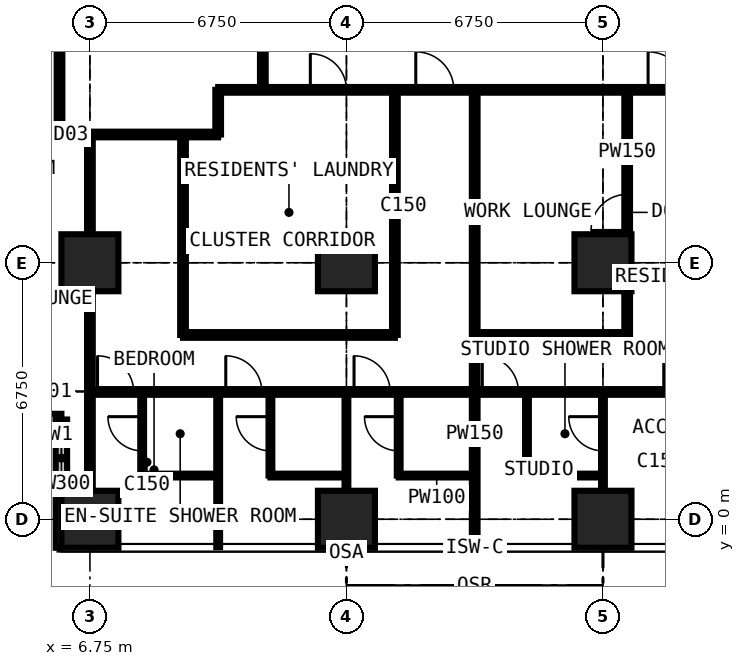
"""IFC4 building model, lengths in metres.
Left out: names, types, materials, properties, quantities, classifications, styles, units other than length and angle.
Written with IfcOpenShell. Run it as: python <this file> out.ifc"""

import sys

from ifc_helpers import new_model, si_unit, direction, frame, frame_2d, origin, origin_2d, place, context, subcontext, project, spatial, rectangle, extrude, element, fill, save


model = new_model("IFC4")
c1 = context("Model", 3, precision=1e-05, world=origin(), true_north=direction((0.0, 1.0)))
c2 = subcontext(c1, "Body", "Model", "MODEL_VIEW")
j1 = project(units=[si_unit("LENGTHUNIT", "METRE"), si_unit("PLANEANGLEUNIT", "RADIAN")], contexts=[c1])
p1 = place(None, origin())
s1 = spatial("IfcSite", under=j1, at=p1, CompositionType="ELEMENT")
p2 = place(p1, origin())
s2 = spatial("IfcBuilding", under=s1, at=p2, CompositionType="ELEMENT")
p3 = place(p2, frame((0.0, 0.0, 153.0)))
s3 = spatial("IfcBuildingStorey", under=s2, at=p3, CompositionType="ELEMENT", Elevation=153.0)
for number, where, z_axis, x_axis in (
    (1, (6.75, 0.0, 0.0), (0.0, 0.0, 1.0), (1.0, 0.0, 0.0)),
    (2, (6.75, 6.75, 0.0), (0.0, 0.0, 1.0), (1.0, 0.0, 0.0)),
    (3, (13.5, 0.0, 0.0), (0.0, 0.0, 1.0), (1.0, 0.0, 0.0)),
    (4, (13.5, 6.75, 0.0), (0.0, 0.0, 1.0), (1.0, 0.0, 0.0)),
    (5, (20.25, 0.0, 0.0), (0.0, 0.0, 1.0), (1.0, 0.0, 0.0)),
    (6, (20.25, 6.75, 0.0), (0.0, 0.0, 1.0), (1.0, 0.0, 0.0)),
):
    element("IfcColumn", number, at=place(p3, frame(where, z_axis=z_axis, x_axis=x_axis)), inside=s3, PredefinedType="COLUMN", context=c2, shape_type="SweptSolid", body=[
        extrude(rectangle(XDim=1.5, YDim=1.5, at=origin_2d()), origin(), (0.0, 0.0, 1.0), 3.6),
    ])
p4 = place(p3, frame((2.625, 2.625, 0.0), z_axis=(0.0, 0.0, 1.0), x_axis=(1.0, 0.0, 0.0)))
e7 = element("IfcWall", 7, at=p4, inside=s3, PredefinedType="SOLIDWALL", context=c2, shape_type="SweptSolid", body=[
    extrude(rectangle(XDim=3.375, YDim=0.3, at=frame_2d((1.688, 0.0))), origin(), (0.0, 0.0, 1.0), 3.375),
])
p5 = place(p4, frame((0.788, 0.0, 0.6)))
e8 = element("IfcOpeningElement", 8, at=p5, cuts=e7, PredefinedType="OPENING", context=c2, shape_type="SweptSolid", body=[
    extrude(rectangle(XDim=1.8, YDim=2.1, at=frame_2d((0.9, 1.05))), frame((0.0, 0.16, 0.0), z_axis=(0.0, -1.0, 0.0), x_axis=(1.0, 0.0, 0.0)), (0.0, 0.0, 1.0), 0.32),
])
p6 = place(p3, frame((6.0, 2.625, 0.0), z_axis=(0.0, 0.0, 1.0), x_axis=(0.0, -1.0, 0.0)))
e9 = element("IfcWall", 9, at=p6, inside=s3, PredefinedType="SOLIDWALL", context=c2, shape_type="SweptSolid", body=[
    extrude(rectangle(XDim=3.375, YDim=0.3, at=frame_2d((1.688, 0.0))), origin(), (0.0, 0.0, 1.0), 3.375),
])
p7 = place(p6, frame((0.268, 0.0, 0.9)))
e10 = element("IfcOpeningElement", 10, at=p7, cuts=e9, PredefinedType="OPENING", context=c2, shape_type="SweptSolid", body=[
    extrude(rectangle(XDim=1.5, YDim=1.8, at=frame_2d((0.75, 0.9))), frame((0.0, 0.16, 0.0), z_axis=(0.0, -1.0, 0.0), x_axis=(1.0, 0.0, 0.0)), (0.0, 0.0, 1.0), 0.32),
])
p8 = place(p3, frame((-0.734, 10.125, 0.0), z_axis=(0.0, 0.0, 1.0), x_axis=(1.0, 0.0, 0.0)))
e11 = element("IfcWall", 11, at=p8, inside=s3, PredefinedType="PARTITIONING", context=c2, shape_type="SweptSolid", body=[
    extrude(rectangle(XDim=10.859, YDim=0.15, at=frame_2d((5.429, 0.0))), origin(), (0.0, 0.0, 1.0), 3.375),
])
p9 = place(p8, frame((4.884, 0.0, 0.0)))
e12 = element("IfcOpeningElement", 12, at=p9, cuts=e11, PredefinedType="OPENING", context=c2, shape_type="SweptSolid", body=[
    extrude(rectangle(XDim=1.0, YDim=2.2, at=frame_2d((0.5, 1.1))), frame((0.0, 0.085, 0.0), z_axis=(0.0, -1.0, 0.0), x_axis=(1.0, 0.0, 0.0)), (0.0, 0.0, 1.0), 0.17),
])
p10 = place(p3, frame((5.95, 10.125, 0.0), z_axis=(0.0, 0.0, 1.0), x_axis=(0.0, 1.0, 0.0)))
e13 = element("IfcWall", 13, at=p10, inside=s3, PredefinedType="PARTITIONING", context=c2, shape_type="SweptSolid", body=[
    extrude(rectangle(XDim=2.65, YDim=0.15, at=frame_2d((1.325, 0.0))), origin(), (0.0, 0.0, 1.0), 3.375),
])
p11 = place(p3, frame((6.75, -0.734, 0.0), z_axis=(0.0, 0.0, 1.0), x_axis=(0.0, 1.0, 0.0)))
e14 = element("IfcWall", 14, at=p11, inside=s3, PredefinedType="PARTITIONING", context=c2, shape_type="SweptSolid", body=[
    extrude(rectangle(XDim=10.859, YDim=0.15, at=frame_2d((5.429, 0.0))), origin(), (0.0, 0.0, 1.0), 2.877),
])
p12 = place(p3, frame((6.75, 3.35, 0.0), z_axis=(0.0, 0.0, 1.0), x_axis=(1.0, 0.0, 0.0)))
e15 = element("IfcWall", 15, at=p12, inside=s3, PredefinedType="PARTITIONING", context=c2, shape_type="SweptSolid", body=[
    extrude(rectangle(XDim=20.25, YDim=0.15, at=frame_2d((10.125, 0.0))), origin(), (0.0, 0.0, 1.0), 3.375),
])
p13 = place(p12, frame((0.2, 0.0, 0.0)))
e16 = element("IfcOpeningElement", 16, at=p13, cuts=e15, PredefinedType="OPENING", context=c2, shape_type="SweptSolid", body=[
    extrude(rectangle(XDim=0.95, YDim=2.2, at=frame_2d((0.475, 1.1))), frame((0.0, 0.085, 0.0), z_axis=(0.0, -1.0, 0.0), x_axis=(1.0, 0.0, 0.0)), (0.0, 0.0, 1.0), 0.17),
])
p14 = place(p12, frame((3.575, 0.0, 0.0)))
e17 = element("IfcOpeningElement", 17, at=p14, cuts=e15, PredefinedType="OPENING", context=c2, shape_type="SweptSolid", body=[
    extrude(rectangle(XDim=0.95, YDim=2.2, at=frame_2d((0.475, 1.1))), frame((0.0, 0.085, 0.0), z_axis=(0.0, -1.0, 0.0), x_axis=(1.0, 0.0, 0.0)), (0.0, 0.0, 1.0), 0.17),
])
p15 = place(p12, frame((6.95, 0.0, 0.0)))
e18 = element("IfcOpeningElement", 18, at=p15, cuts=e15, PredefinedType="OPENING", context=c2, shape_type="SweptSolid", body=[
    extrude(rectangle(XDim=0.95, YDim=2.2, at=frame_2d((0.475, 1.1))), frame((0.0, 0.085, 0.0), z_axis=(0.0, -1.0, 0.0), x_axis=(1.0, 0.0, 0.0)), (0.0, 0.0, 1.0), 0.17),
])
p16 = place(p12, frame((15.1, 0.0, 0.0)))
e19 = element("IfcOpeningElement", 19, at=p16, cuts=e15, PredefinedType="OPENING", context=c2, shape_type="SweptSolid", body=[
    extrude(rectangle(XDim=0.95, YDim=2.2, at=frame_2d((0.475, 1.1))), frame((0.0, 0.085, 0.0), z_axis=(0.0, -1.0, 0.0), x_axis=(1.0, 0.0, 0.0)), (0.0, 0.0, 1.0), 0.17),
])
p17 = place(p12, frame((10.325, 0.0, 0.0)))
e20 = element("IfcOpeningElement", 20, at=p17, cuts=e15, PredefinedType="OPENING", context=c2, shape_type="SweptSolid", body=[
    extrude(rectangle(XDim=0.95, YDim=2.2, at=frame_2d((0.475, 1.1))), frame((0.0, 0.085, 0.0), z_axis=(0.0, -1.0, 0.0), x_axis=(1.0, 0.0, 0.0)), (0.0, 0.0, 1.0), 0.17),
])
p18 = place(p3, frame((8.125, 1.15, 0.0), z_axis=(0.0, 0.0, 1.0), x_axis=(0.0, 1.0, 0.0)))
e21 = element("IfcWall", 21, at=p18, inside=s3, PredefinedType="PARTITIONING", context=c2, shape_type="SweptSolid", body=[
    extrude(rectangle(XDim=2.2, YDim=0.1, at=frame_2d((1.1, 0.0))), origin(), (0.0, 0.0, 1.0), 3.375),
])
p19 = place(p18, frame((0.65, 0.0, 0.0)))
e22 = element("IfcOpeningElement", 22, at=p19, cuts=e21, PredefinedType="OPENING", context=c2, shape_type="SweptSolid", body=[
    extrude(rectangle(XDim=0.9, YDim=2.2, at=frame_2d((0.45, 1.1))), frame((0.0, 0.06, 0.0), z_axis=(0.0, -1.0, 0.0), x_axis=(1.0, 0.0, 0.0)), (0.0, 0.0, 1.0), 0.12),
])
p20 = place(p3, frame((8.125, 1.15, 0.0), z_axis=(0.0, 0.0, 1.0), x_axis=(1.0, 0.0, 0.0)))
e23 = element("IfcWall", 23, at=p20, inside=s3, PredefinedType="PARTITIONING", context=c2, shape_type="SweptSolid", body=[
    extrude(rectangle(XDim=2.0, YDim=0.1, at=frame_2d((1.0, 0.0))), origin(), (0.0, 0.0, 1.0), 3.375),
])
p21 = place(p3, frame((9.2, 4.85, 0.0), z_axis=(0.0, 0.0, 1.0), x_axis=(0.0, 1.0, 0.0)))
e24 = element("IfcWall", 24, at=p21, inside=s3, PredefinedType="PARTITIONING", context=c2, shape_type="SweptSolid", body=[
    extrude(rectangle(XDim=5.275, YDim=0.15, at=frame_2d((2.637, 0.0))), origin(), (0.0, 0.0, 1.0), 3.375),
])
p22 = place(p3, frame((9.2, 4.85, 0.0), z_axis=(0.0, 0.0, 1.0), x_axis=(1.0, 0.0, 0.0)))
e25 = element("IfcWall", 25, at=p22, inside=s3, PredefinedType="PARTITIONING", context=c2, shape_type="SweptSolid", body=[
    extrude(rectangle(XDim=5.575, YDim=0.15, at=frame_2d((2.788, 0.0))), origin(), (0.0, 0.0, 1.0), 3.375),
])
p23 = place(p3, frame((10.125, -0.734, 0.0), z_axis=(0.0, 0.0, 1.0), x_axis=(0.0, 1.0, 0.0)))
e26 = element("IfcWall", 26, at=p23, inside=s3, PredefinedType="PARTITIONING", context=c2, shape_type="SweptSolid", body=[
    extrude(rectangle(XDim=4.084, YDim=0.1, at=frame_2d((2.042, 0.0))), origin(), (0.0, 0.0, 1.0), 3.375),
])
p24 = place(p3, frame((10.125, 10.125, 0.0), z_axis=(0.0, 0.0, 1.0), x_axis=(0.0, 1.0, 0.0)))
e27 = element("IfcWall", 27, at=p24, inside=s3, PredefinedType="PARTITIONING", context=c2, shape_type="SweptSolid", body=[
    extrude(rectangle(XDim=1.175, YDim=0.15, at=frame_2d((0.587, 0.0))), origin(), (0.0, 0.0, 1.0), 3.375),
])
p25 = place(p3, frame((10.125, 11.3, 0.0), z_axis=(0.0, 0.0, 1.0), x_axis=(1.0, 0.0, 0.0)))
e28 = element("IfcWall", 28, at=p25, inside=s3, PredefinedType="PARTITIONING", context=c2, shape_type="SweptSolid", body=[
    extrude(rectangle(XDim=20.25, YDim=0.15, at=frame_2d((10.125, 0.0))), origin(), (0.0, 0.0, 1.0), 3.375),
])
p26 = place(p25, frame((5.2, 0.0, 0.0)))
e29 = element("IfcOpeningElement", 29, at=p26, cuts=e28, PredefinedType="OPENING", context=c2, shape_type="SweptSolid", body=[
    extrude(rectangle(XDim=1.0, YDim=2.2, at=frame_2d((0.5, 1.1))), frame((0.0, 0.085, 0.0), z_axis=(0.0, -1.0, 0.0), x_axis=(1.0, 0.0, 0.0)), (0.0, 0.0, 1.0), 0.17),
])
p27 = place(p25, frame((11.312, 0.0, 0.0)))
e30 = element("IfcOpeningElement", 30, at=p27, cuts=e28, PredefinedType="OPENING", context=c2, shape_type="SweptSolid", body=[
    extrude(rectangle(XDim=1.0, YDim=2.2, at=frame_2d((0.5, 1.1))), frame((0.0, 0.085, 0.0), z_axis=(0.0, -1.0, 0.0), x_axis=(1.0, 0.0, 0.0)), (0.0, 0.0, 1.0), 0.17),
])
p28 = place(p25, frame((2.425, 0.0, 0.0)))
e31 = element("IfcOpeningElement", 31, at=p28, cuts=e28, PredefinedType="OPENING", context=c2, shape_type="SweptSolid", body=[
    extrude(rectangle(XDim=0.95, YDim=2.2, at=frame_2d((0.475, 1.1))), frame((0.0, 0.085, 0.0), z_axis=(0.0, -1.0, 0.0), x_axis=(1.0, 0.0, 0.0)), (0.0, 0.0, 1.0), 0.17),
])
p29 = place(p3, frame((11.3, 11.3, 0.0), z_axis=(0.0, 0.0, 1.0), x_axis=(0.0, 1.0, 0.0)))
e32 = element("IfcWall", 32, at=p29, inside=s3, PredefinedType="PARTITIONING", context=c2, shape_type="SweptSolid", body=[
    extrude(rectangle(XDim=19.3, YDim=0.15, at=frame_2d((9.65, 0.0))), origin(), (0.0, 0.0, 1.0), 3.375),
])
p30 = place(p29, frame((13.525, 0.0, 0.0)))
e33 = element("IfcOpeningElement", 33, at=p30, cuts=e32, PredefinedType="OPENING", context=c2, shape_type="SweptSolid", body=[
    extrude(rectangle(XDim=1.0, YDim=2.2, at=frame_2d((0.5, 1.1))), frame((0.0, 0.085, 0.0), z_axis=(0.0, -1.0, 0.0), x_axis=(1.0, 0.0, 0.0)), (0.0, 0.0, 1.0), 0.17),
])
p31 = place(p29, frame((10.438, 0.0, 0.0)))
e34 = element("IfcOpeningElement", 34, at=p31, cuts=e32, PredefinedType="OPENING", context=c2, shape_type="SweptSolid", body=[
    extrude(rectangle(XDim=1.0, YDim=2.2, at=frame_2d((0.5, 1.1))), frame((0.0, 0.085, 0.0), z_axis=(0.0, -1.0, 0.0), x_axis=(1.0, 0.0, 0.0)), (0.0, 0.0, 1.0), 0.17),
])
p32 = place(p3, frame((11.5, 1.15, 0.0), z_axis=(0.0, 0.0, 1.0), x_axis=(0.0, 1.0, 0.0)))
e35 = element("IfcWall", 35, at=p32, inside=s3, PredefinedType="PARTITIONING", context=c2, shape_type="SweptSolid", body=[
    extrude(rectangle(XDim=2.2, YDim=0.1, at=frame_2d((1.1, 0.0))), origin(), (0.0, 0.0, 1.0), 3.375),
])
p33 = place(p32, frame((0.65, 0.0, 0.0)))
e36 = element("IfcOpeningElement", 36, at=p33, cuts=e35, PredefinedType="OPENING", context=c2, shape_type="SweptSolid", body=[
    extrude(rectangle(XDim=0.9, YDim=2.2, at=frame_2d((0.45, 1.1))), frame((0.0, 0.06, 0.0), z_axis=(0.0, -1.0, 0.0), x_axis=(1.0, 0.0, 0.0)), (0.0, 0.0, 1.0), 0.12),
])
p34 = place(p3, frame((11.5, 1.15, 0.0), z_axis=(0.0, 0.0, 1.0), x_axis=(1.0, 0.0, 0.0)))
e37 = element("IfcWall", 37, at=p34, inside=s3, PredefinedType="PARTITIONING", context=c2, shape_type="SweptSolid", body=[
    extrude(rectangle(XDim=2.0, YDim=0.1, at=frame_2d((1.0, 0.0))), origin(), (0.0, 0.0, 1.0), 3.375),
])
p35 = place(p3, frame((13.5, -0.734, 0.0), z_axis=(0.0, 0.0, 1.0), x_axis=(0.0, 1.0, 0.0)))
e38 = element("IfcWall", 38, at=p35, inside=s3, PredefinedType="PARTITIONING", context=c2, shape_type="SweptSolid", body=[
    extrude(rectangle(XDim=4.084, YDim=0.1, at=frame_2d((2.042, 0.0))), origin(), (0.0, 0.0, 1.0), 2.61),
])
p36 = place(p3, frame((14.775, 4.85, 0.0), z_axis=(0.0, 0.0, 1.0), x_axis=(0.0, 1.0, 0.0)))
e39 = element("IfcWall", 39, at=p36, inside=s3, PredefinedType="PARTITIONING", context=c2, shape_type="SweptSolid", body=[
    extrude(rectangle(XDim=6.45, YDim=0.15, at=frame_2d((3.225, 0.0))), origin(), (0.0, 0.0, 1.0), 3.375),
])
p37 = place(p3, frame((14.875, 1.15, 0.0), z_axis=(0.0, 0.0, 1.0), x_axis=(0.0, 1.0, 0.0)))
e40 = element("IfcWall", 40, at=p37, inside=s3, PredefinedType="PARTITIONING", context=c2, shape_type="SweptSolid", body=[
    extrude(rectangle(XDim=2.2, YDim=0.1, at=frame_2d((1.1, 0.0))), origin(), (0.0, 0.0, 1.0), 3.375),
])
p38 = place(p37, frame((0.65, 0.0, 0.0)))
e41 = element("IfcOpeningElement", 41, at=p38, cuts=e40, PredefinedType="OPENING", context=c2, shape_type="SweptSolid", body=[
    extrude(rectangle(XDim=0.9, YDim=2.2, at=frame_2d((0.45, 1.1))), frame((0.0, 0.06, 0.0), z_axis=(0.0, -1.0, 0.0), x_axis=(1.0, 0.0, 0.0)), (0.0, 0.0, 1.0), 0.12),
])
p39 = place(p3, frame((14.875, 1.15, 0.0), z_axis=(0.0, 0.0, 1.0), x_axis=(1.0, 0.0, 0.0)))
e42 = element("IfcWall", 42, at=p39, inside=s3, PredefinedType="PARTITIONING", context=c2, shape_type="SweptSolid", body=[
    extrude(rectangle(XDim=2.0, YDim=0.1, at=frame_2d((1.0, 0.0))), origin(), (0.0, 0.0, 1.0), 3.375),
])
p40 = place(p3, frame((16.875, -0.734, 0.0), z_axis=(0.0, 0.0, 1.0), x_axis=(0.0, 1.0, 0.0)))
e43 = element("IfcWall", 43, at=p40, inside=s3, PredefinedType="PARTITIONING", context=c2, shape_type="SweptSolid", body=[
    extrude(rectangle(XDim=12.034, YDim=0.15, at=frame_2d((6.017, 0.0))), origin(), (0.0, 0.0, 1.0), 3.375),
])
p41 = place(p3, frame((16.875, 4.85, 0.0), z_axis=(0.0, 0.0, 1.0), x_axis=(1.0, 0.0, 0.0)))
e44 = element("IfcWall", 44, at=p41, inside=s3, PredefinedType="PARTITIONING", context=c2, shape_type="SweptSolid", body=[
    extrude(rectangle(XDim=4.012, YDim=0.15, at=frame_2d((2.006, 0.0))), origin(), (0.0, 0.0, 1.0), 3.375),
])
p42 = place(p3, frame((18.25, 1.15, 0.0), z_axis=(0.0, 0.0, 1.0), x_axis=(0.0, 1.0, 0.0)))
e45 = element("IfcWall", 45, at=p42, inside=s3, PredefinedType="PARTITIONING", context=c2, shape_type="SweptSolid", body=[
    extrude(rectangle(XDim=2.2, YDim=0.1, at=frame_2d((1.1, 0.0))), origin(), (0.0, 0.0, 1.0), 3.375),
])
p43 = place(p3, frame((18.25, 1.15, 0.0), z_axis=(0.0, 0.0, 1.0), x_axis=(1.0, 0.0, 0.0)))
e46 = element("IfcWall", 46, at=p43, inside=s3, PredefinedType="PARTITIONING", context=c2, shape_type="SweptSolid", body=[
    extrude(rectangle(XDim=2.0, YDim=0.1, at=frame_2d((1.0, 0.0))), origin(), (0.0, 0.0, 1.0), 3.375),
])
p44 = place(p3, frame((20.25, -0.734, 0.0), z_axis=(0.0, 0.0, 1.0), x_axis=(0.0, 1.0, 0.0)))
e47 = element("IfcWall", 47, at=p44, inside=s3, PredefinedType="PARTITIONING", context=c2, shape_type="SweptSolid", body=[
    extrude(rectangle(XDim=4.084, YDim=0.1, at=frame_2d((2.042, 0.0))), origin(), (0.0, 0.0, 1.0), 2.61),
])
p45 = place(p44, frame((2.534, 0.0, 0.0)))
e48 = element("IfcOpeningElement", 48, at=p45, cuts=e47, PredefinedType="OPENING", context=c2, shape_type="SweptSolid", body=[
    extrude(rectangle(XDim=0.9, YDim=2.2, at=frame_2d((0.45, 1.1))), frame((0.0, 0.06, 0.0), z_axis=(0.0, -1.0, 0.0), x_axis=(1.0, 0.0, 0.0)), (0.0, 0.0, 1.0), 0.12),
])
p46 = place(p3, frame((20.887, 4.85, 0.0), z_axis=(0.0, 0.0, 1.0), x_axis=(0.0, 1.0, 0.0)))
e49 = element("IfcWall", 49, at=p46, inside=s3, PredefinedType="PARTITIONING", context=c2, shape_type="SweptSolid", body=[
    extrude(rectangle(XDim=6.45, YDim=0.15, at=frame_2d((3.225, 0.0))), origin(), (0.0, 0.0, 1.0), 3.375),
])
p47 = place(p46, frame((2.75, 0.0, 0.0)))
e50 = element("IfcOpeningElement", 50, at=p47, cuts=e49, PredefinedType="OPENING", context=c2, shape_type="SweptSolid", body=[
    extrude(rectangle(XDim=0.95, YDim=2.2, at=frame_2d((0.475, 1.1))), frame((0.0, 0.085, 0.0), z_axis=(0.0, -1.0, 0.0), x_axis=(1.0, 0.0, 0.0)), (0.0, 0.0, 1.0), 0.17),
])
p48 = place(p7, origin())
e51 = element("IfcWindow", 51, at=p48, inside=s3, PartitioningType="SINGLE_PANEL", PredefinedType="WINDOW", context=c2, shape_type="SweptSolid", body=[
    extrude(rectangle(XDim=1.5, YDim=1.8, at=frame_2d((0.75, 0.9))), frame((0.0, 0.03, 0.0), z_axis=(0.0, -1.0, 0.0), x_axis=(1.0, 0.0, 0.0)), (0.0, 0.0, 1.0), 0.06),
])
fill(e10, e51)
p49 = place(p13, origin())
e52 = element("IfcDoor", 52, at=p49, inside=s3, OperationType="SINGLE_SWING_LEFT", PredefinedType="DOOR", context=c2, shape_type="SweptSolid", body=[
    extrude(rectangle(XDim=0.95, YDim=2.2, at=frame_2d((0.475, 1.1))), frame((0.0, 0.025, 0.0), z_axis=(0.0, -1.0, 0.0), x_axis=(1.0, 0.0, 0.0)), (0.0, 0.0, 1.0), 0.05),
])
fill(e16, e52)
p50 = place(p19, origin())
e53 = element("IfcDoor", 53, at=p50, inside=s3, OperationType="SINGLE_SWING_RIGHT", PredefinedType="DOOR", context=c2, shape_type="SweptSolid", body=[
    extrude(rectangle(XDim=0.9, YDim=2.2, at=frame_2d((0.45, 1.1))), frame((0.0, 0.025, 0.0), z_axis=(0.0, -1.0, 0.0), x_axis=(1.0, 0.0, 0.0)), (0.0, 0.0, 1.0), 0.05),
])
fill(e22, e53)
p51 = place(p14, origin())
e54 = element("IfcDoor", 54, at=p51, inside=s3, OperationType="SINGLE_SWING_LEFT", PredefinedType="DOOR", context=c2, shape_type="SweptSolid", body=[
    extrude(rectangle(XDim=0.95, YDim=2.2, at=frame_2d((0.475, 1.1))), frame((0.0, 0.025, 0.0), z_axis=(0.0, -1.0, 0.0), x_axis=(1.0, 0.0, 0.0)), (0.0, 0.0, 1.0), 0.05),
])
fill(e17, e54)
p52 = place(p33, origin())
e55 = element("IfcDoor", 55, at=p52, inside=s3, OperationType="SINGLE_SWING_RIGHT", PredefinedType="DOOR", context=c2, shape_type="SweptSolid", body=[
    extrude(rectangle(XDim=0.9, YDim=2.2, at=frame_2d((0.45, 1.1))), frame((0.0, 0.025, 0.0), z_axis=(0.0, -1.0, 0.0), x_axis=(1.0, 0.0, 0.0)), (0.0, 0.0, 1.0), 0.05),
])
fill(e36, e55)
p53 = place(p15, origin())
e56 = element("IfcDoor", 56, at=p53, inside=s3, OperationType="SINGLE_SWING_LEFT", PredefinedType="DOOR", context=c2, shape_type="SweptSolid", body=[
    extrude(rectangle(XDim=0.95, YDim=2.2, at=frame_2d((0.475, 1.1))), frame((0.0, 0.025, 0.0), z_axis=(0.0, -1.0, 0.0), x_axis=(1.0, 0.0, 0.0)), (0.0, 0.0, 1.0), 0.05),
])
fill(e18, e56)
p54 = place(p38, origin())
e57 = element("IfcDoor", 57, at=p54, inside=s3, OperationType="SINGLE_SWING_RIGHT", PredefinedType="DOOR", context=c2, shape_type="SweptSolid", body=[
    extrude(rectangle(XDim=0.9, YDim=2.2, at=frame_2d((0.45, 1.1))), frame((0.0, 0.025, 0.0), z_axis=(0.0, -1.0, 0.0), x_axis=(1.0, 0.0, 0.0)), (0.0, 0.0, 1.0), 0.05),
])
fill(e41, e57)
p55 = place(p26, origin())
e58 = element("IfcDoor", 58, at=p55, inside=s3, OperationType="SINGLE_SWING_LEFT", PredefinedType="DOOR", context=c2, shape_type="SweptSolid", body=[
    extrude(rectangle(XDim=1.0, YDim=2.2, at=frame_2d((0.5, 1.1))), frame((0.0, 0.025, 0.0), z_axis=(0.0, -1.0, 0.0), x_axis=(1.0, 0.0, 0.0)), (0.0, 0.0, 1.0), 0.05),
])
fill(e29, e58)
p56 = place(p16, origin())
e59 = element("IfcDoor", 59, at=p56, inside=s3, OperationType="SINGLE_SWING_LEFT", PredefinedType="DOOR", context=c2, shape_type="SweptSolid", body=[
    extrude(rectangle(XDim=0.95, YDim=2.2, at=frame_2d((0.475, 1.1))), frame((0.0, 0.025, 0.0), z_axis=(0.0, -1.0, 0.0), x_axis=(1.0, 0.0, 0.0)), (0.0, 0.0, 1.0), 0.05),
])
fill(e19, e59)
p57 = place(p17, origin())
e60 = element("IfcDoor", 60, at=p57, inside=s3, OperationType="SINGLE_SWING_LEFT", PredefinedType="DOOR", context=c2, shape_type="SweptSolid", body=[
    extrude(rectangle(XDim=0.95, YDim=2.2, at=frame_2d((0.475, 1.1))), frame((0.0, 0.025, 0.0), z_axis=(0.0, -1.0, 0.0), x_axis=(1.0, 0.0, 0.0)), (0.0, 0.0, 1.0), 0.05),
])
fill(e20, e60)
p58 = place(p45, origin())
e61 = element("IfcDoor", 61, at=p58, inside=s3, OperationType="SINGLE_SWING_RIGHT", PredefinedType="DOOR", context=c2, shape_type="SweptSolid", body=[
    extrude(rectangle(XDim=0.9, YDim=2.2, at=frame_2d((0.45, 1.1))), frame((0.0, 0.025, 0.0), z_axis=(0.0, -1.0, 0.0), x_axis=(1.0, 0.0, 0.0)), (0.0, 0.0, 1.0), 0.05),
])
fill(e48, e61)
p59 = place(p27, origin())
e62 = element("IfcDoor", 62, at=p59, inside=s3, OperationType="SINGLE_SWING_LEFT", PredefinedType="DOOR", context=c2, shape_type="SweptSolid", body=[
    extrude(rectangle(XDim=1.0, YDim=2.2, at=frame_2d((0.5, 1.1))), frame((0.0, 0.025, 0.0), z_axis=(0.0, -1.0, 0.0), x_axis=(1.0, 0.0, 0.0)), (0.0, 0.0, 1.0), 0.05),
])
fill(e30, e62)
p60 = place(p28, origin())
e63 = element("IfcDoor", 63, at=p60, inside=s3, OperationType="SINGLE_SWING_LEFT", PredefinedType="DOOR", context=c2, shape_type="SweptSolid", body=[
    extrude(rectangle(XDim=0.95, YDim=2.2, at=frame_2d((0.475, 1.1))), frame((0.0, 0.025, 0.0), z_axis=(0.0, -1.0, 0.0), x_axis=(1.0, 0.0, 0.0)), (0.0, 0.0, 1.0), 0.05),
])
fill(e31, e63)
p61 = place(p47, origin())
e64 = element("IfcDoor", 64, at=p61, inside=s3, OperationType="SINGLE_SWING_LEFT", PredefinedType="DOOR", context=c2, shape_type="SweptSolid", body=[
    extrude(rectangle(XDim=0.95, YDim=2.2, at=frame_2d((0.475, 1.1))), frame((0.0, 0.025, 0.0), z_axis=(0.0, -1.0, 0.0), x_axis=(1.0, 0.0, 0.0)), (0.0, 0.0, 1.0), 0.05),
])
fill(e50, e64)
save(model, sys.argv[1])
